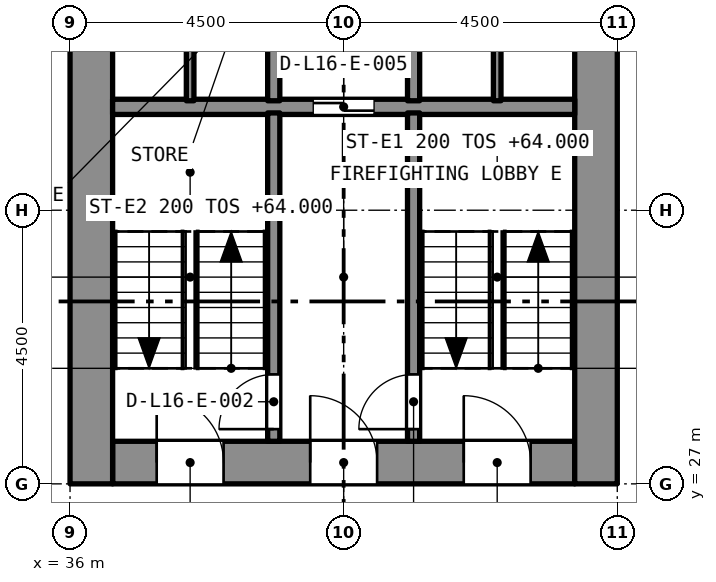
"""IFC4 building model, lengths in metres.
Left out: names, types, materials, properties, quantities, classifications, styles, units other than length and angle.
Written with IfcOpenShell. Run it as: python <this file> out.ifc"""

import sys

from ifc_helpers import new_model, si_unit, direction, frame, frame_2d, origin, place, context, subcontext, project, spatial, rectangle, extrude, element, fill, save


model = new_model("IFC4")
c1 = context("Model", 3, precision=1e-05, world=origin(), true_north=direction((0.0, 1.0)))
c2 = subcontext(c1, "Body", "Model", "MODEL_VIEW")
j1 = project(units=[si_unit("LENGTHUNIT", "METRE"), si_unit("PLANEANGLEUNIT", "RADIAN")], contexts=[c1])
p1 = place(None, origin())
s1 = spatial("IfcSite", under=j1, at=p1, CompositionType="ELEMENT")
p2 = place(p1, origin())
s2 = spatial("IfcBuilding", under=s1, at=p2, CompositionType="ELEMENT")
p3 = place(p2, frame((0.0, 0.0, 62.4)))
s3 = spatial("IfcBuildingStorey", under=s2, at=p3, CompositionType="ELEMENT", Elevation=62.4)
p4 = place(p3, frame((36.7, 27.35, 0.0), z_axis=(0.0, 0.0, 1.0), x_axis=(1.0, 0.0, 0.0)))
e1 = element("IfcWall", 1, at=p4, inside=s3, PredefinedType="SOLIDWALL", context=c2, shape_type="SweptSolid", body=[
    extrude(rectangle(XDim=7.6, YDim=0.7, at=frame_2d((3.8, 0.0))), origin(), (0.0, 0.0, 1.0), 3.2),
])
p5 = place(p4, frame((5.775, 0.0, 0.0)))
e2 = element("IfcOpeningElement", 2, at=p5, cuts=e1, PredefinedType="OPENING", context=c2, shape_type="SweptSolid", body=[
    extrude(rectangle(XDim=1.1, YDim=2.1, at=frame_2d((0.55, 1.05))), frame((0.0, 0.36, 0.0), z_axis=(0.0, -1.0, 0.0), x_axis=(1.0, 0.0, 0.0)), (0.0, 0.0, 1.0), 0.72),
])
p6 = place(p4, frame((3.25, 0.0, 0.0)))
e3 = element("IfcOpeningElement", 3, at=p6, cuts=e1, PredefinedType="OPENING", context=c2, shape_type="SweptSolid", body=[
    extrude(rectangle(XDim=1.1, YDim=2.1, at=frame_2d((0.55, 1.05))), frame((0.0, 0.36, 0.0), z_axis=(0.0, -1.0, 0.0), x_axis=(1.0, 0.0, 0.0)), (0.0, 0.0, 1.0), 0.72),
])
p7 = place(p4, frame((0.725, 0.0, 0.0)))
e4 = element("IfcOpeningElement", 4, at=p7, cuts=e1, PredefinedType="OPENING", context=c2, shape_type="SweptSolid", body=[
    extrude(rectangle(XDim=1.1, YDim=2.1, at=frame_2d((0.55, 1.05))), frame((0.0, 0.36, 0.0), z_axis=(0.0, -1.0, 0.0), x_axis=(1.0, 0.0, 0.0)), (0.0, 0.0, 1.0), 0.72),
])
p8 = place(p3, frame((36.35, 27.0, 0.0), z_axis=(0.0, 0.0, 1.0), x_axis=(0.0, 1.0, 0.0)))
e5 = element("IfcWall", 5, at=p8, inside=s3, PredefinedType="SOLIDWALL", context=c2, shape_type="SweptSolid", body=[
    extrude(rectangle(XDim=13.5, YDim=0.7, at=frame_2d((6.75, 0.0))), origin(), (0.0, 0.0, 1.0), 3.2),
])
p9 = place(p8, frame((8.95, 0.0, 0.0)))
e6 = element("IfcOpeningElement", 6, at=p9, cuts=e5, PredefinedType="OPENING", context=c2, shape_type="SweptSolid", body=[
    extrude(rectangle(XDim=1.2, YDim=2.1, at=frame_2d((0.6, 1.05))), frame((0.0, 0.36, 0.0), z_axis=(0.0, -1.0, 0.0), x_axis=(1.0, 0.0, 0.0)), (0.0, 0.0, 1.0), 0.72),
])
p10 = place(p3, frame((44.65, 27.0, 0.0), z_axis=(0.0, 0.0, 1.0), x_axis=(0.0, 1.0, 0.0)))
e7 = element("IfcWall", 7, at=p10, inside=s3, PredefinedType="SOLIDWALL", context=c2, shape_type="SweptSolid", body=[
    extrude(rectangle(XDim=13.5, YDim=0.7, at=frame_2d((6.75, 0.0))), origin(), (0.0, 0.0, 1.0), 3.2),
])
p11 = place(p10, frame((8.95, 0.0, 0.0)))
e8 = element("IfcOpeningElement", 8, at=p11, cuts=e7, PredefinedType="OPENING", context=c2, shape_type="SweptSolid", body=[
    extrude(rectangle(XDim=1.2, YDim=2.1, at=frame_2d((0.6, 1.05))), frame((0.0, 0.36, 0.0), z_axis=(0.0, -1.0, 0.0), x_axis=(1.0, 0.0, 0.0)), (0.0, 0.0, 1.0), 0.72),
])
p12 = place(p3, frame((36.7, 33.2, 0.0), z_axis=(0.0, 0.0, 1.0), x_axis=(1.0, 0.0, 0.0)))
e9 = element("IfcWall", 9, at=p12, inside=s3, PredefinedType="SOLIDWALL", context=c2, shape_type="SweptSolid", body=[
    extrude(rectangle(XDim=7.6, YDim=0.25, at=frame_2d((3.8, 0.0))), origin(), (0.0, 0.0, 1.0), 2.9),
])
p13 = place(p12, frame((3.3, 0.0, 0.0)))
e10 = element("IfcOpeningElement", 10, at=p13, cuts=e9, PredefinedType="OPENING", context=c2, shape_type="SweptSolid", body=[
    extrude(rectangle(XDim=1.0, YDim=2.1, at=frame_2d((0.5, 1.05))), frame((0.0, 0.135, 0.0), z_axis=(0.0, -1.0, 0.0), x_axis=(1.0, 0.0, 0.0)), (0.0, 0.0, 1.0), 0.27),
])
p14 = place(p3, frame((41.65, 27.7, 0.0), z_axis=(0.0, 0.0, 1.0), x_axis=(0.0, 1.0, 0.0)))
e11 = element("IfcWall", 11, at=p14, inside=s3, PredefinedType="SOLIDWALL", context=c2, shape_type="SweptSolid", body=[
    extrude(rectangle(XDim=5.4, YDim=0.2, at=frame_2d((2.7, 0.0))), origin(), (0.0, 0.0, 1.0), 2.9),
])
p15 = place(p14, frame((0.2, 0.0, 0.0)))
e12 = element("IfcOpeningElement", 12, at=p15, cuts=e11, PredefinedType="OPENING", context=c2, shape_type="SweptSolid", body=[
    extrude(rectangle(XDim=0.9, YDim=2.1, at=frame_2d((0.45, 1.05))), frame((0.0, 0.11, 0.0), z_axis=(0.0, -1.0, 0.0), x_axis=(1.0, 0.0, 0.0)), (0.0, 0.0, 1.0), 0.22),
])
p16 = place(p3, frame((39.35, 27.7, 0.0), z_axis=(0.0, 0.0, 1.0), x_axis=(0.0, 1.0, 0.0)))
e13 = element("IfcWall", 13, at=p16, inside=s3, PredefinedType="SOLIDWALL", context=c2, shape_type="SweptSolid", body=[
    extrude(rectangle(XDim=5.4, YDim=0.2, at=frame_2d((2.7, 0.0))), origin(), (0.0, 0.0, 1.0), 2.9),
])
p17 = place(p16, frame((0.2, 0.0, 0.0)))
e14 = element("IfcOpeningElement", 14, at=p17, cuts=e13, PredefinedType="OPENING", context=c2, shape_type="SweptSolid", body=[
    extrude(rectangle(XDim=0.9, YDim=2.1, at=frame_2d((0.45, 1.05))), frame((0.0, 0.11, 0.0), z_axis=(0.0, -1.0, 0.0), x_axis=(1.0, 0.0, 0.0)), (0.0, 0.0, 1.0), 0.22),
])
for number, where, z_axis, x_axis in (
    (15, (41.65, 33.3, 0.0), (0.0, 0.0, 1.0), (0.0, 1.0, 0.0)),
    (16, (39.35, 33.3, 0.0), (0.0, 0.0, 1.0), (0.0, 1.0, 0.0)),
):
    element("IfcWall", number, at=place(p3, frame(where, z_axis=z_axis, x_axis=x_axis)), inside=s3, PredefinedType="SOLIDWALL", context=c2, shape_type="SweptSolid", body=[
        extrude(rectangle(XDim=2.3, YDim=0.2, at=frame_2d((1.15, 0.0))), origin(), (0.0, 0.0, 1.0), 2.9),
    ])
for number, where, z_axis, x_axis in (
    (17, (43.025, 33.3, 0.0), (0.0, 0.0, 1.0), (0.0, 1.0, 0.0)),
    (18, (37.975, 33.3, 0.0), (0.0, 0.0, 1.0), (0.0, 1.0, 0.0)),
):
    element("IfcWall", number, at=place(p3, frame(where, z_axis=z_axis, x_axis=x_axis)), inside=s3, PredefinedType="PARTITIONING", context=c2, shape_type="SweptSolid", body=[
        extrude(rectangle(XDim=2.3, YDim=0.125, at=frame_2d((1.15, 0.0))), origin(), (0.0, 0.0, 1.0), 2.9),
    ])
p18 = place(p15, origin())
e19 = element("IfcDoor", 19, at=p18, inside=s3, OperationType="SINGLE_SWING_LEFT", PredefinedType="DOOR", context=c2, shape_type="SweptSolid", body=[
    extrude(rectangle(XDim=0.9, YDim=2.1, at=frame_2d((0.45, 1.05))), frame((0.0, 0.025, 0.0), z_axis=(0.0, -1.0, 0.0), x_axis=(1.0, 0.0, 0.0)), (0.0, 0.0, 1.0), 0.05),
])
fill(e12, e19)
p19 = place(p17, origin())
e20 = element("IfcDoor", 20, at=p19, inside=s3, OperationType="SINGLE_SWING_LEFT", PredefinedType="DOOR", context=c2, shape_type="SweptSolid", body=[
    extrude(rectangle(XDim=0.9, YDim=2.1, at=frame_2d((0.45, 1.05))), frame((0.0, 0.025, 0.0), z_axis=(0.0, -1.0, 0.0), x_axis=(1.0, 0.0, 0.0)), (0.0, 0.0, 1.0), 0.05),
])
fill(e14, e20)
p20 = place(p13, origin())
e21 = element("IfcDoor", 21, at=p20, inside=s3, OperationType="SLIDING_TO_LEFT", PredefinedType="DOOR", context=c2, shape_type="SweptSolid", body=[
    extrude(rectangle(XDim=1.0, YDim=2.1, at=frame_2d((0.5, 1.05))), frame((0.0, 0.025, 0.0), z_axis=(0.0, -1.0, 0.0), x_axis=(1.0, 0.0, 0.0)), (0.0, 0.0, 1.0), 0.05),
])
fill(e10, e21)
p21 = place(p5, origin())
e22 = element("IfcDoor", 22, at=p21, inside=s3, OperationType="SINGLE_SWING_LEFT", PredefinedType="DOOR", context=c2, shape_type="SweptSolid", body=[
    extrude(rectangle(XDim=1.1, YDim=2.1, at=frame_2d((0.55, 1.05))), frame((0.0, 0.025, 0.0), z_axis=(0.0, -1.0, 0.0), x_axis=(1.0, 0.0, 0.0)), (0.0, 0.0, 1.0), 0.05),
])
fill(e2, e22)
p22 = place(p6, origin())
e23 = element("IfcDoor", 23, at=p22, inside=s3, OperationType="SINGLE_SWING_LEFT", PredefinedType="DOOR", context=c2, shape_type="SweptSolid", body=[
    extrude(rectangle(XDim=1.1, YDim=2.1, at=frame_2d((0.55, 1.05))), frame((0.0, 0.025, 0.0), z_axis=(0.0, -1.0, 0.0), x_axis=(1.0, 0.0, 0.0)), (0.0, 0.0, 1.0), 0.05),
])
fill(e3, e23)
p23 = place(p7, origin())
e24 = element("IfcDoor", 24, at=p23, inside=s3, OperationType="SINGLE_SWING_LEFT", PredefinedType="DOOR", context=c2, shape_type="SweptSolid", body=[
    extrude(rectangle(XDim=1.1, YDim=2.1, at=frame_2d((0.55, 1.05))), frame((0.0, 0.025, 0.0), z_axis=(0.0, -1.0, 0.0), x_axis=(1.0, 0.0, 0.0)), (0.0, 0.0, 1.0), 0.05),
])
fill(e4, e24)
save(model, sys.argv[1])
